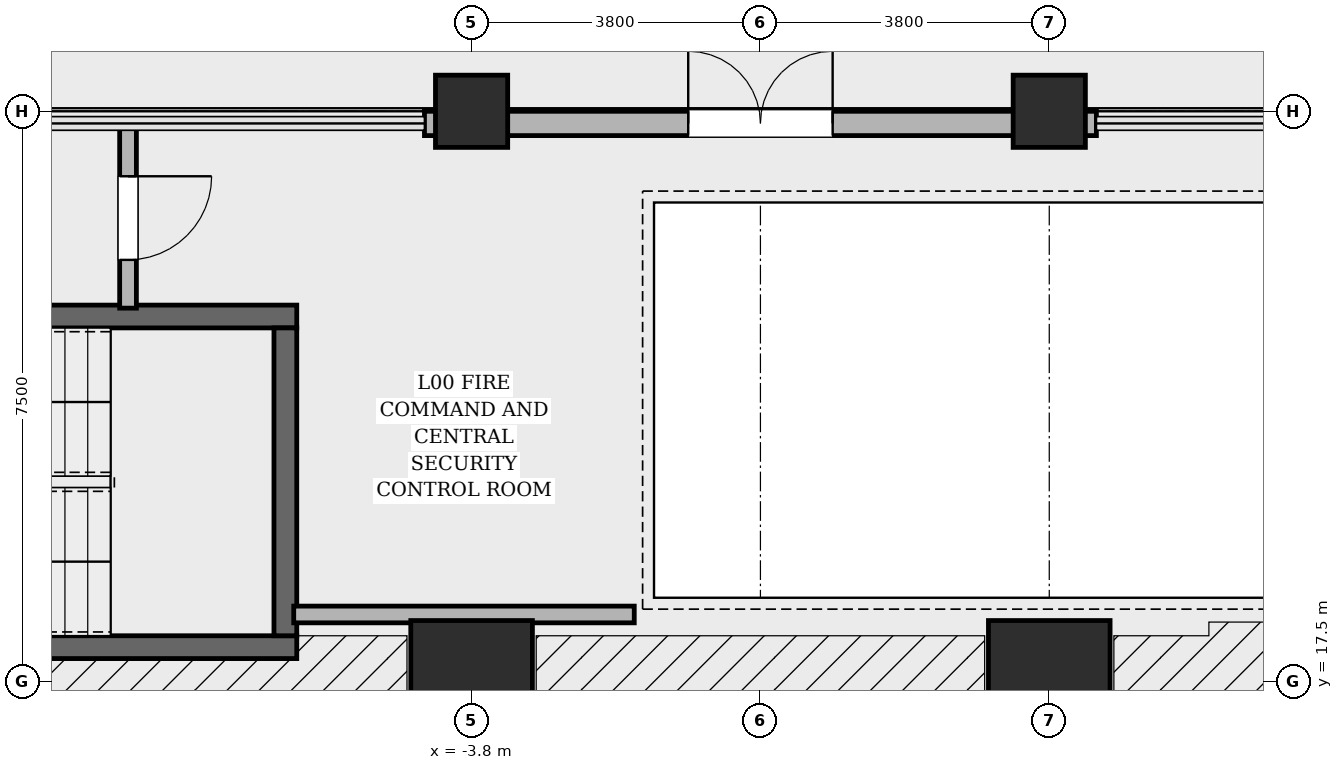
"""IFC4 building model, lengths in metres.
Left out: names, types, materials, properties, quantities, classifications, styles, units other than length and angle.
Written with IfcOpenShell. Run it as: python <this file> out.ifc"""

import sys

from ifc_helpers import new_model, si_unit, direction, frame, frame_2d, origin, origin_2d, place, context, subcontext, project, spatial, rectangle, hollow_rectangle, extrude, element, fill, save


model = new_model("IFC4")
c1 = context("Model", 3, precision=1e-05, world=origin(), true_north=direction((0.0, 1.0)))
c2 = subcontext(c1, "Body", "Model", "MODEL_VIEW")
j1 = project(units=[si_unit("LENGTHUNIT", "METRE"), si_unit("PLANEANGLEUNIT", "RADIAN")], contexts=[c1])
p1 = place(None, origin())
s1 = spatial("IfcSite", under=j1, at=p1, CompositionType="ELEMENT")
p2 = place(p1, origin())
s2 = spatial("IfcBuilding", under=s1, at=p2, CompositionType="ELEMENT")
p3 = place(p2, origin())
s3 = spatial("IfcBuildingStorey", under=s2, at=p3, CompositionType="ELEMENT", Elevation=0.0)
for number, where, z_axis, x_axis in (
    (1, (-16.5, 17.95, 0.0), (0.0, 0.0, 1.0), (1.0, 0.0, 0.0)),
    (2, (-6.1, 22.3, 0.0), (0.0, 0.0, 1.0), (-1.0, 0.0, 0.0)),
):
    element("IfcWall", number, at=place(p3, frame(where, z_axis=z_axis, x_axis=x_axis)), inside=s3, PredefinedType="SOLIDWALL", context=c2, shape_type="SweptSolid", body=[
        extrude(rectangle(XDim=10.4, YDim=0.3, at=frame_2d((5.2, 0.0))), origin(), (0.0, 0.0, 1.0), 6.0),
    ])
p4 = place(p3, frame((-6.25, 22.15, 0.0), z_axis=(0.0, 0.0, 1.0), x_axis=(0.0, -1.0, 0.0)))
e3 = element("IfcWall", 3, at=p4, inside=s3, PredefinedType="SOLIDWALL", context=c2, shape_type="SweptSolid", body=[
    extrude(rectangle(XDim=4.05, YDim=0.3, at=frame_2d((2.025, 0.0))), origin(), (0.0, 0.0, 1.0), 6.0),
])
for number, where, z_axis, x_axis in (
    (4, (3.8, 17.5, 0.0), (0.0, 0.0, 1.0), (1.0, 0.0, 0.0)),
    (5, (-3.8, 17.5, 0.0), (0.0, 0.0, 1.0), (1.0, 0.0, 0.0)),
):
    element("IfcColumn", number, at=place(p3, frame(where, z_axis=z_axis, x_axis=x_axis)), inside=s3, PredefinedType="COLUMN", context=c2, shape_type="SweptSolid", body=[
        extrude(hollow_rectangle(XDim=1.6, YDim=1.6, WallThickness=0.05, at=origin_2d()), origin(), (0.0, 0.0, 1.0), 6.0),
    ])
for number, where, z_axis, x_axis in (
    (6, (-3.8, 25.0, 0.0), (0.0, 0.0, 1.0), (1.0, 0.0, 0.0)),
    (7, (3.8, 25.0, 0.0), (0.0, 0.0, 1.0), (1.0, 0.0, 0.0)),
):
    element("IfcColumn", number, at=place(p3, frame(where, z_axis=z_axis, x_axis=x_axis)), inside=s3, PredefinedType="COLUMN", context=c2, shape_type="SweptSolid", body=[
        extrude(rectangle(XDim=0.95, YDim=0.95, at=origin_2d()), origin(), (0.0, 0.0, 1.0), 6.0),
    ])
p5 = place(p3, frame((-4.42, 24.84, 0.0), z_axis=(0.0, 0.0, 1.0), x_axis=(1.0, 0.0, 0.0)))
e8 = element("IfcWall", 8, at=p5, inside=s3, PredefinedType="SOLIDWALL", context=c2, shape_type="SweptSolid", body=[
    extrude(rectangle(XDim=8.84, YDim=0.32, at=frame_2d((4.42, 0.0))), origin(), (0.0, 0.0, 1.0), 5.014),
])
p6 = place(p5, frame((3.47, 0.0, 0.0)))
e9 = element("IfcOpeningElement", 9, at=p6, cuts=e8, PredefinedType="OPENING", context=c2, shape_type="SweptSolid", body=[
    extrude(rectangle(XDim=1.9, YDim=2.4, at=frame_2d((0.95, 1.2))), frame((0.0, 0.17, 0.0), z_axis=(0.0, -1.0, 0.0), x_axis=(1.0, 0.0, 0.0)), (0.0, 0.0, 1.0), 0.34),
])
p7 = place(p3, frame((-1.66, 18.38, 0.0), z_axis=(0.0, 0.0, 1.0), x_axis=(-1.0, 0.0, 0.0)))
e10 = element("IfcWall", 10, at=p7, inside=s3, PredefinedType="SOLIDWALL", context=c2, shape_type="SweptSolid", body=[
    extrude(rectangle(XDim=4.48, YDim=0.22, at=frame_2d((2.24, 0.0))), origin(), (0.0, 0.0, 1.0), 5.014),
])
p8 = place(p3, frame((-8.32, 22.41, 0.0), z_axis=(0.0, 0.0, 1.0), x_axis=(0.0, 1.0, 0.0)))
e11 = element("IfcWall", 11, at=p8, inside=s3, PredefinedType="SOLIDWALL", context=c2, shape_type="SweptSolid", body=[
    extrude(rectangle(XDim=2.37, YDim=0.22, at=frame_2d((1.185, 0.0))), origin(), (0.0, 0.0, 1.0), 5.72),
])
p9 = place(p8, frame((0.635, 0.0, 0.0)))
e12 = element("IfcOpeningElement", 12, at=p9, cuts=e11, PredefinedType="OPENING", context=c2, shape_type="SweptSolid", body=[
    extrude(rectangle(XDim=1.1, YDim=2.2, at=frame_2d((0.55, 1.1))), frame((0.0, 0.12, 0.0), z_axis=(0.0, -1.0, 0.0), x_axis=(1.0, 0.0, 0.0)), (0.0, 0.0, 1.0), 0.24),
])
p10 = place(p6, origin())
e13 = element("IfcDoor", 13, at=p10, inside=s3, OperationType="DOUBLE_DOOR_SINGLE_SWING", PredefinedType="DOOR", context=c2, shape_type="SweptSolid", body=[
    extrude(rectangle(XDim=1.9, YDim=2.4, at=frame_2d((0.95, 1.2))), frame((0.0, 0.025, 0.0), z_axis=(0.0, -1.0, 0.0), x_axis=(1.0, 0.0, 0.0)), (0.0, 0.0, 1.0), 0.05),
])
fill(e9, e13)
p11 = place(p9, origin())
e14 = element("IfcDoor", 14, at=p11, inside=s3, OperationType="SINGLE_SWING_RIGHT", PredefinedType="DOOR", context=c2, shape_type="SweptSolid", body=[
    extrude(rectangle(XDim=1.1, YDim=2.2, at=frame_2d((0.55, 1.1))), frame((0.0, 0.025, 0.0), z_axis=(0.0, -1.0, 0.0), x_axis=(1.0, 0.0, 0.0)), (0.0, 0.0, 1.0), 0.05),
])
fill(e12, e14)
save(model, sys.argv[1])
